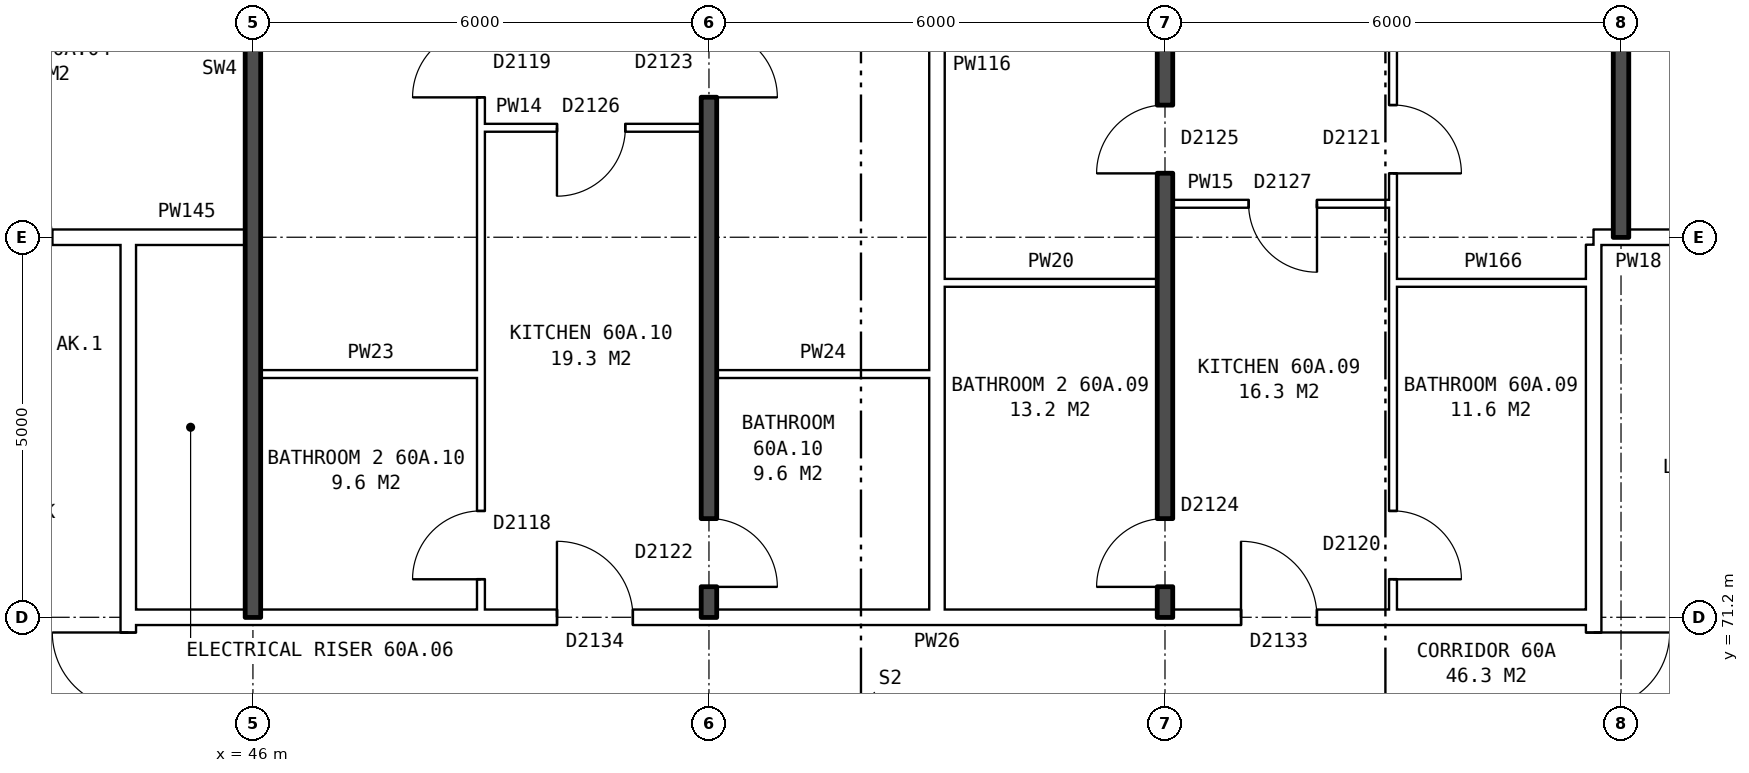
"""IFC4 building model, lengths in metres.
Left out: names, types, materials, properties, quantities, classifications, styles, units other than length and angle.
Written with IfcOpenShell. Run it as: python <this file> out.ifc"""

import sys

from ifc_helpers import new_model, si_unit, direction, frame, frame_2d, origin, place, context, subcontext, project, spatial, rectangle, extrude, element, fill, save


model = new_model("IFC4")
c1 = context("Model", 3, precision=1e-05, world=origin(), true_north=direction((0.0, 1.0)))
c2 = subcontext(c1, "Body", "Model", "MODEL_VIEW")
j1 = project(units=[si_unit("LENGTHUNIT", "METRE"), si_unit("PLANEANGLEUNIT", "RADIAN")], contexts=[c1])
p1 = place(None, origin())
s1 = spatial("IfcSite", under=j1, at=p1, CompositionType="ELEMENT")
p2 = place(p1, origin())
s2 = spatial("IfcBuilding", under=s1, at=p2, CompositionType="ELEMENT")
p3 = place(p2, frame((0.0, 0.0, 212.1)))
s3 = spatial("IfcBuildingStorey", under=s2, at=p3, CompositionType="ELEMENT", Elevation=212.1)
p4 = place(p3, frame((63.64, 63.9, 0.0), z_axis=(0.0, 0.0, 1.0), x_axis=(0.0, 1.0, 0.0)))
e1 = element("IfcWall", 1, at=p4, inside=s3, PredefinedType="PARTITIONING", context=c2, shape_type="SweptSolid", body=[
    extrude(rectangle(XDim=12.2, YDim=0.2, at=frame_2d((6.1, 0.0))), origin(), (0.0, 0.0, 1.0), 2.85),
])
p5 = place(p4, frame((5.1, 0.0, 0.0)))
e2 = element("IfcOpeningElement", 2, at=p5, cuts=e1, PredefinedType="OPENING", context=c2, shape_type="SweptSolid", body=[
    extrude(rectangle(XDim=2.0, YDim=2.1, at=frame_2d((1.0, 1.05))), frame((0.0, 0.11, 0.0), z_axis=(0.0, -1.0, 0.0), x_axis=(1.0, 0.0, 0.0)), (0.0, 0.0, 1.0), 0.22),
])
p6 = place(p3, frame((44.36, 63.9, 0.0), z_axis=(0.0, 0.0, 1.0), x_axis=(0.0, 1.0, 0.0)))
e3 = element("IfcWall", 3, at=p6, inside=s3, PredefinedType="PARTITIONING", context=c2, shape_type="SweptSolid", body=[
    extrude(rectangle(XDim=12.2, YDim=0.2, at=frame_2d((6.1, 0.0))), origin(), (0.0, 0.0, 1.0), 2.85),
])
p7 = place(p6, frame((5.1, 0.0, 0.0)))
e4 = element("IfcOpeningElement", 4, at=p7, cuts=e3, PredefinedType="OPENING", context=c2, shape_type="SweptSolid", body=[
    extrude(rectangle(XDim=2.0, YDim=2.1, at=frame_2d((1.0, 1.05))), frame((0.0, 0.11, 0.0), z_axis=(0.0, -1.0, 0.0), x_axis=(1.0, 0.0, 0.0)), (0.0, 0.0, 1.0), 0.22),
])
p8 = place(p3, frame((44.36, 71.2, 0.0), z_axis=(0.0, 0.0, 1.0), x_axis=(1.0, 0.0, 0.0)))
e5 = element("IfcWall", 5, at=p8, inside=s3, PredefinedType="PARTITIONING", context=c2, shape_type="SweptSolid", body=[
    extrude(rectangle(XDim=19.28, YDim=0.2, at=frame_2d((9.64, 0.0))), origin(), (0.0, 0.0, 1.0), 2.85),
])
p9 = place(p8, frame((14.64, 0.0, 0.0)))
e6 = element("IfcOpeningElement", 6, at=p9, cuts=e5, PredefinedType="OPENING", context=c2, shape_type="SweptSolid", body=[
    extrude(rectangle(XDim=1.0, YDim=2.1, at=frame_2d((0.5, 1.05))), frame((0.0, 0.11, 0.0), z_axis=(0.0, -1.0, 0.0), x_axis=(1.0, 0.0, 0.0)), (0.0, 0.0, 1.0), 0.22),
])
p10 = place(p8, frame((5.64, 0.0, 0.0)))
e7 = element("IfcOpeningElement", 7, at=p10, cuts=e5, PredefinedType="OPENING", context=c2, shape_type="SweptSolid", body=[
    extrude(rectangle(XDim=1.0, YDim=2.1, at=frame_2d((0.5, 1.05))), frame((0.0, 0.11, 0.0), z_axis=(0.0, -1.0, 0.0), x_axis=(1.0, 0.0, 0.0)), (0.0, 0.0, 1.0), 0.22),
])
p11 = place(p3, frame((46.1, 74.4, 0.0), z_axis=(0.0, 0.0, 1.0), x_axis=(1.0, 0.0, 0.0)))
e8 = element("IfcWall", 8, at=p11, inside=s3, PredefinedType="PARTITIONING", context=c2, shape_type="SweptSolid", body=[
    extrude(rectangle(XDim=2.9, YDim=0.1, at=frame_2d((1.45, 0.0))), origin(), (0.0, 0.0, 1.0), 2.85),
])
for number, where, z_axis, x_axis in (
    (9, (52.1, 74.4, 0.0), (0.0, 0.0, 1.0), (1.0, 0.0, 0.0)),
    (10, (55.1, 75.6, 0.0), (0.0, 0.0, 1.0), (1.0, 0.0, 0.0)),
):
    element("IfcWall", number, at=place(p3, frame(where, z_axis=z_axis, x_axis=x_axis)), inside=s3, PredefinedType="PARTITIONING", context=c2, shape_type="SweptSolid", body=[
        extrude(rectangle(XDim=2.8, YDim=0.1, at=frame_2d((1.4, 0.0))), origin(), (0.0, 0.0, 1.0), 2.85),
    ])
p12 = place(p3, frame((61.0, 75.6, 0.0), z_axis=(0.0, 0.0, 1.0), x_axis=(1.0, 0.0, 0.0)))
e11 = element("IfcWall", 11, at=p12, inside=s3, PredefinedType="PARTITIONING", context=c2, shape_type="SweptSolid", body=[
    extrude(rectangle(XDim=2.64, YDim=0.1, at=frame_2d((1.32, 0.0))), origin(), (0.0, 0.0, 1.0), 2.85),
])
p13 = place(p3, frame((41.36, 76.2, 0.0), z_axis=(0.0, 0.0, 1.0), x_axis=(1.0, 0.0, 0.0)))
e12 = element("IfcWall", 12, at=p13, inside=s3, PredefinedType="PARTITIONING", context=c2, shape_type="SweptSolid", body=[
    extrude(rectangle(XDim=3.0, YDim=0.2, at=frame_2d((1.5, 0.0))), origin(), (0.0, 0.0, 1.0), 2.85),
])
p14 = place(p13, frame((1.0, 0.0, 0.0)))
e13 = element("IfcOpeningElement", 13, at=p14, cuts=e12, PredefinedType="OPENING", context=c2, shape_type="SweptSolid", body=[
    extrude(rectangle(XDim=1.0, YDim=2.1, at=frame_2d((0.5, 1.05))), frame((0.0, 0.11, 0.0), z_axis=(0.0, -1.0, 0.0), x_axis=(1.0, 0.0, 0.0)), (0.0, 0.0, 1.0), 0.22),
])
p15 = place(p3, frame((44.36, 76.2, 0.0), z_axis=(0.0, 0.0, 1.0), x_axis=(1.0, 0.0, 0.0)))
e14 = element("IfcWall", 14, at=p15, inside=s3, PredefinedType="PARTITIONING", context=c2, shape_type="SweptSolid", body=[
    extrude(rectangle(XDim=1.54, YDim=0.2, at=frame_2d((0.77, 0.0))), origin(), (0.0, 0.0, 1.0), 2.85),
])
p16 = place(p3, frame((63.64, 76.2, 0.0), z_axis=(0.0, 0.0, 1.0), x_axis=(1.0, 0.0, 0.0)))
e15 = element("IfcWall", 15, at=p16, inside=s3, PredefinedType="PARTITIONING", context=c2, shape_type="SweptSolid", body=[
    extrude(rectangle(XDim=3.0, YDim=0.2, at=frame_2d((1.5, 0.0))), origin(), (0.0, 0.0, 1.0), 2.85),
])
p17 = place(p16, frame((1.18, 0.0, 0.0)))
e16 = element("IfcOpeningElement", 16, at=p17, cuts=e15, PredefinedType="OPENING", context=c2, shape_type="SweptSolid", body=[
    extrude(rectangle(XDim=1.0, YDim=2.1, at=frame_2d((0.5, 1.05))), frame((0.0, 0.11, 0.0), z_axis=(0.0, -1.0, 0.0), x_axis=(1.0, 0.0, 0.0)), (0.0, 0.0, 1.0), 0.22),
])
p18 = place(p3, frame((58.1, 76.64, 0.0), z_axis=(0.0, 0.0, 1.0), x_axis=(1.0, 0.0, 0.0)))
e17 = element("IfcWall", 17, at=p18, inside=s3, PredefinedType="PARTITIONING", context=c2, shape_type="SweptSolid", body=[
    extrude(rectangle(XDim=2.9, YDim=0.1, at=frame_2d((1.45, 0.0))), origin(), (0.0, 0.0, 1.0), 2.85),
])
p19 = place(p18, frame((1.0, 0.0, 0.0)))
e18 = element("IfcOpeningElement", 18, at=p19, cuts=e17, PredefinedType="OPENING", context=c2, shape_type="SweptSolid", body=[
    extrude(rectangle(XDim=0.9, YDim=2.1, at=frame_2d((0.45, 1.05))), frame((0.0, 0.06, 0.0), z_axis=(0.0, -1.0, 0.0), x_axis=(1.0, 0.0, 0.0)), (0.0, 0.0, 1.0), 0.12),
])
p20 = place(p3, frame((49.0, 77.64, 0.0), z_axis=(0.0, 0.0, 1.0), x_axis=(1.0, 0.0, 0.0)))
e19 = element("IfcWall", 19, at=p20, inside=s3, PredefinedType="PARTITIONING", context=c2, shape_type="SweptSolid", body=[
    extrude(rectangle(XDim=2.9, YDim=0.1, at=frame_2d((1.45, 0.0))), origin(), (0.0, 0.0, 1.0), 2.85),
])
p21 = place(p20, frame((1.0, 0.0, 0.0)))
e20 = element("IfcOpeningElement", 20, at=p21, cuts=e19, PredefinedType="OPENING", context=c2, shape_type="SweptSolid", body=[
    extrude(rectangle(XDim=0.9, YDim=2.1, at=frame_2d((0.45, 1.05))), frame((0.0, 0.06, 0.0), z_axis=(0.0, -1.0, 0.0), x_axis=(1.0, 0.0, 0.0)), (0.0, 0.0, 1.0), 0.12),
])
p22 = place(p3, frame((46.0, 71.2, 0.0), z_axis=(0.0, 0.0, 1.0), x_axis=(0.0, 1.0, 0.0)))
e21 = element("IfcWall", 21, at=p22, inside=s3, PredefinedType="SOLIDWALL", context=c2, shape_type="SweptSolid", body=[
    extrude(rectangle(XDim=14.44, YDim=0.2, at=frame_2d((7.22, 0.0))), origin(), (0.0, 0.0, 1.0), 2.85),
])
p23 = place(p3, frame((49.0, 71.3, 0.0), z_axis=(0.0, 0.0, 1.0), x_axis=(0.0, 1.0, 0.0)))
e22 = element("IfcWall", 22, at=p23, inside=s3, PredefinedType="PARTITIONING", context=c2, shape_type="SweptSolid", body=[
    extrude(rectangle(XDim=14.34, YDim=0.1, at=frame_2d((7.17, 0.0))), origin(), (0.0, 0.0, 1.0), 2.85),
])
p24 = place(p23, frame((6.74, 0.0, 0.0)))
e23 = element("IfcOpeningElement", 23, at=p24, cuts=e22, PredefinedType="OPENING", context=c2, shape_type="SweptSolid", body=[
    extrude(rectangle(XDim=0.9, YDim=2.1, at=frame_2d((0.45, 1.05))), frame((0.0, 0.06, 0.0), z_axis=(0.0, -1.0, 0.0), x_axis=(1.0, 0.0, 0.0)), (0.0, 0.0, 1.0), 0.12),
])
p25 = place(p23, frame((0.4, 0.0, 0.0)))
e24 = element("IfcOpeningElement", 24, at=p25, cuts=e22, PredefinedType="OPENING", context=c2, shape_type="SweptSolid", body=[
    extrude(rectangle(XDim=0.9, YDim=2.1, at=frame_2d((0.45, 1.05))), frame((0.0, 0.06, 0.0), z_axis=(0.0, -1.0, 0.0), x_axis=(1.0, 0.0, 0.0)), (0.0, 0.0, 1.0), 0.12),
])
p26 = place(p3, frame((52.0, 71.2, 0.0), z_axis=(0.0, 0.0, 1.0), x_axis=(0.0, 1.0, 0.0)))
e25 = element("IfcWall", 25, at=p26, inside=s3, PredefinedType="SOLIDWALL", context=c2, shape_type="SweptSolid", body=[
    extrude(rectangle(XDim=14.44, YDim=0.2, at=frame_2d((7.22, 0.0))), origin(), (0.0, 0.0, 1.0), 2.85),
])
p27 = place(p26, frame((6.84, 0.0, 0.0)))
e26 = element("IfcOpeningElement", 26, at=p27, cuts=e25, PredefinedType="OPENING", context=c2, shape_type="SweptSolid", body=[
    extrude(rectangle(XDim=0.9, YDim=2.1, at=frame_2d((0.45, 1.05))), frame((0.0, 0.11, 0.0), z_axis=(0.0, -1.0, 0.0), x_axis=(1.0, 0.0, 0.0)), (0.0, 0.0, 1.0), 0.22),
])
p28 = place(p26, frame((0.4, 0.0, 0.0)))
e27 = element("IfcOpeningElement", 27, at=p28, cuts=e25, PredefinedType="OPENING", context=c2, shape_type="SweptSolid", body=[
    extrude(rectangle(XDim=0.9, YDim=2.1, at=frame_2d((0.45, 1.05))), frame((0.0, 0.11, 0.0), z_axis=(0.0, -1.0, 0.0), x_axis=(1.0, 0.0, 0.0)), (0.0, 0.0, 1.0), 0.22),
])
p29 = place(p3, frame((55.0, 71.3, 0.0), z_axis=(0.0, 0.0, 1.0), x_axis=(0.0, 1.0, 0.0)))
e28 = element("IfcWall", 28, at=p29, inside=s3, PredefinedType="PARTITIONING", context=c2, shape_type="SweptSolid", body=[
    extrude(rectangle(XDim=14.34, YDim=0.2, at=frame_2d((7.17, 0.0))), origin(), (0.0, 0.0, 1.0), 2.85),
])
p30 = place(p3, frame((58.0, 71.2, 0.0), z_axis=(0.0, 0.0, 1.0), x_axis=(0.0, 1.0, 0.0)))
e29 = element("IfcWall", 29, at=p30, inside=s3, PredefinedType="SOLIDWALL", context=c2, shape_type="SweptSolid", body=[
    extrude(rectangle(XDim=14.44, YDim=0.2, at=frame_2d((7.22, 0.0))), origin(), (0.0, 0.0, 1.0), 2.85),
])
p31 = place(p30, frame((5.84, 0.0, 0.0)))
e30 = element("IfcOpeningElement", 30, at=p31, cuts=e29, PredefinedType="OPENING", context=c2, shape_type="SweptSolid", body=[
    extrude(rectangle(XDim=0.9, YDim=2.1, at=frame_2d((0.45, 1.05))), frame((0.0, 0.11, 0.0), z_axis=(0.0, -1.0, 0.0), x_axis=(1.0, 0.0, 0.0)), (0.0, 0.0, 1.0), 0.22),
])
p32 = place(p30, frame((0.4, 0.0, 0.0)))
e31 = element("IfcOpeningElement", 31, at=p32, cuts=e29, PredefinedType="OPENING", context=c2, shape_type="SweptSolid", body=[
    extrude(rectangle(XDim=0.9, YDim=2.1, at=frame_2d((0.45, 1.05))), frame((0.0, 0.11, 0.0), z_axis=(0.0, -1.0, 0.0), x_axis=(1.0, 0.0, 0.0)), (0.0, 0.0, 1.0), 0.22),
])
p33 = place(p3, frame((61.0, 71.3, 0.0), z_axis=(0.0, 0.0, 1.0), x_axis=(0.0, 1.0, 0.0)))
e32 = element("IfcWall", 32, at=p33, inside=s3, PredefinedType="PARTITIONING", context=c2, shape_type="SweptSolid", body=[
    extrude(rectangle(XDim=14.34, YDim=0.1, at=frame_2d((7.17, 0.0))), origin(), (0.0, 0.0, 1.0), 2.85),
])
p34 = place(p33, frame((5.74, 0.0, 0.0)))
e33 = element("IfcOpeningElement", 33, at=p34, cuts=e32, PredefinedType="OPENING", context=c2, shape_type="SweptSolid", body=[
    extrude(rectangle(XDim=0.9, YDim=2.1, at=frame_2d((0.45, 1.05))), frame((0.0, 0.06, 0.0), z_axis=(0.0, -1.0, 0.0), x_axis=(1.0, 0.0, 0.0)), (0.0, 0.0, 1.0), 0.12),
])
p35 = place(p33, frame((0.4, 0.0, 0.0)))
e34 = element("IfcOpeningElement", 34, at=p35, cuts=e32, PredefinedType="OPENING", context=c2, shape_type="SweptSolid", body=[
    extrude(rectangle(XDim=0.9, YDim=2.1, at=frame_2d((0.45, 1.05))), frame((0.0, 0.06, 0.0), z_axis=(0.0, -1.0, 0.0), x_axis=(1.0, 0.0, 0.0)), (0.0, 0.0, 1.0), 0.12),
])
p36 = place(p3, frame((64.0, 76.2, 0.0), z_axis=(0.0, 0.0, 1.0), x_axis=(0.0, 1.0, 0.0)))
e35 = element("IfcWall", 35, at=p36, inside=s3, PredefinedType="SOLIDWALL", context=c2, shape_type="SweptSolid", body=[
    extrude(rectangle(XDim=9.44, YDim=0.2, at=frame_2d((4.72, 0.0))), origin(), (0.0, 0.0, 1.0), 2.85),
])
p37 = place(p5, frame((2.0, 0.0, 0.0), z_axis=(0.0, 0.0, 1.0), x_axis=(-1.0, 0.0, 0.0)))
e36 = element("IfcDoor", 36, at=p37, inside=s3, OperationType="DOUBLE_DOOR_SINGLE_SWING", PredefinedType="DOOR", context=c2, shape_type="SweptSolid", body=[
    extrude(rectangle(XDim=2.0, YDim=2.1, at=frame_2d((1.0, 1.05))), frame((0.0, 0.025, 0.0), z_axis=(0.0, -1.0, 0.0), x_axis=(1.0, 0.0, 0.0)), (0.0, 0.0, 1.0), 0.05),
])
fill(e2, e36)
p38 = place(p7, origin())
e37 = element("IfcDoor", 37, at=p38, inside=s3, OperationType="DOUBLE_DOOR_SINGLE_SWING", PredefinedType="DOOR", context=c2, shape_type="SweptSolid", body=[
    extrude(rectangle(XDim=2.0, YDim=2.1, at=frame_2d((1.0, 1.05))), frame((0.0, 0.025, 0.0), z_axis=(0.0, -1.0, 0.0), x_axis=(1.0, 0.0, 0.0)), (0.0, 0.0, 1.0), 0.05),
])
fill(e4, e37)
p39 = place(p34, frame((0.9, 0.0, 0.0), z_axis=(0.0, 0.0, 1.0), x_axis=(-1.0, 0.0, 0.0)))
e38 = element("IfcDoor", 38, at=p39, inside=s3, OperationType="SINGLE_SWING_RIGHT", PredefinedType="DOOR", context=c2, shape_type="SweptSolid", body=[
    extrude(rectangle(XDim=0.9, YDim=2.1, at=frame_2d((0.45, 1.05))), frame((0.0, 0.025, 0.0), z_axis=(0.0, -1.0, 0.0), x_axis=(1.0, 0.0, 0.0)), (0.0, 0.0, 1.0), 0.05),
])
fill(e33, e38)
p40 = place(p31, origin())
e39 = element("IfcDoor", 39, at=p40, inside=s3, OperationType="SINGLE_SWING_LEFT", PredefinedType="DOOR", context=c2, shape_type="SweptSolid", body=[
    extrude(rectangle(XDim=0.9, YDim=2.1, at=frame_2d((0.45, 1.05))), frame((0.0, 0.025, 0.0), z_axis=(0.0, -1.0, 0.0), x_axis=(1.0, 0.0, 0.0)), (0.0, 0.0, 1.0), 0.05),
])
fill(e30, e39)
p41 = place(p9, origin())
e40 = element("IfcDoor", 40, at=p41, inside=s3, OperationType="SINGLE_SWING_LEFT", PredefinedType="DOOR", context=c2, shape_type="SweptSolid", body=[
    extrude(rectangle(XDim=1.0, YDim=2.1, at=frame_2d((0.5, 1.05))), frame((0.0, 0.025, 0.0), z_axis=(0.0, -1.0, 0.0), x_axis=(1.0, 0.0, 0.0)), (0.0, 0.0, 1.0), 0.05),
])
fill(e6, e40)
p42 = place(p19, frame((0.9, 0.0, 0.0), z_axis=(0.0, 0.0, 1.0), x_axis=(-1.0, 0.0, 0.0)))
e41 = element("IfcDoor", 41, at=p42, inside=s3, OperationType="SINGLE_SWING_LEFT", PredefinedType="DOOR", context=c2, shape_type="SweptSolid", body=[
    extrude(rectangle(XDim=0.9, YDim=2.1, at=frame_2d((0.45, 1.05))), frame((0.0, 0.025, 0.0), z_axis=(0.0, -1.0, 0.0), x_axis=(1.0, 0.0, 0.0)), (0.0, 0.0, 1.0), 0.05),
])
fill(e18, e41)
p43 = place(p35, frame((0.9, 0.0, 0.0), z_axis=(0.0, 0.0, 1.0), x_axis=(-1.0, 0.0, 0.0)))
e42 = element("IfcDoor", 42, at=p43, inside=s3, OperationType="SINGLE_SWING_RIGHT", PredefinedType="DOOR", context=c2, shape_type="SweptSolid", body=[
    extrude(rectangle(XDim=0.9, YDim=2.1, at=frame_2d((0.45, 1.05))), frame((0.0, 0.025, 0.0), z_axis=(0.0, -1.0, 0.0), x_axis=(1.0, 0.0, 0.0)), (0.0, 0.0, 1.0), 0.05),
])
fill(e34, e42)
p44 = place(p32, origin())
e43 = element("IfcDoor", 43, at=p44, inside=s3, OperationType="SINGLE_SWING_LEFT", PredefinedType="DOOR", context=c2, shape_type="SweptSolid", body=[
    extrude(rectangle(XDim=0.9, YDim=2.1, at=frame_2d((0.45, 1.05))), frame((0.0, 0.025, 0.0), z_axis=(0.0, -1.0, 0.0), x_axis=(1.0, 0.0, 0.0)), (0.0, 0.0, 1.0), 0.05),
])
fill(e31, e43)
p45 = place(p27, frame((0.9, 0.0, 0.0), z_axis=(0.0, 0.0, 1.0), x_axis=(-1.0, 0.0, 0.0)))
e44 = element("IfcDoor", 44, at=p45, inside=s3, OperationType="SINGLE_SWING_RIGHT", PredefinedType="DOOR", context=c2, shape_type="SweptSolid", body=[
    extrude(rectangle(XDim=0.9, YDim=2.1, at=frame_2d((0.45, 1.05))), frame((0.0, 0.025, 0.0), z_axis=(0.0, -1.0, 0.0), x_axis=(1.0, 0.0, 0.0)), (0.0, 0.0, 1.0), 0.05),
])
fill(e26, e44)
p46 = place(p24, origin())
e45 = element("IfcDoor", 45, at=p46, inside=s3, OperationType="SINGLE_SWING_LEFT", PredefinedType="DOOR", context=c2, shape_type="SweptSolid", body=[
    extrude(rectangle(XDim=0.9, YDim=2.1, at=frame_2d((0.45, 1.05))), frame((0.0, 0.025, 0.0), z_axis=(0.0, -1.0, 0.0), x_axis=(1.0, 0.0, 0.0)), (0.0, 0.0, 1.0), 0.05),
])
fill(e23, e45)
p47 = place(p10, origin())
e46 = element("IfcDoor", 46, at=p47, inside=s3, OperationType="SINGLE_SWING_LEFT", PredefinedType="DOOR", context=c2, shape_type="SweptSolid", body=[
    extrude(rectangle(XDim=1.0, YDim=2.1, at=frame_2d((0.5, 1.05))), frame((0.0, 0.025, 0.0), z_axis=(0.0, -1.0, 0.0), x_axis=(1.0, 0.0, 0.0)), (0.0, 0.0, 1.0), 0.05),
])
fill(e7, e46)
p48 = place(p21, frame((0.9, 0.0, 0.0), z_axis=(0.0, 0.0, 1.0), x_axis=(-1.0, 0.0, 0.0)))
e47 = element("IfcDoor", 47, at=p48, inside=s3, OperationType="SINGLE_SWING_RIGHT", PredefinedType="DOOR", context=c2, shape_type="SweptSolid", body=[
    extrude(rectangle(XDim=0.9, YDim=2.1, at=frame_2d((0.45, 1.05))), frame((0.0, 0.025, 0.0), z_axis=(0.0, -1.0, 0.0), x_axis=(1.0, 0.0, 0.0)), (0.0, 0.0, 1.0), 0.05),
])
fill(e20, e47)
p49 = place(p28, frame((0.9, 0.0, 0.0), z_axis=(0.0, 0.0, 1.0), x_axis=(-1.0, 0.0, 0.0)))
e48 = element("IfcDoor", 48, at=p49, inside=s3, OperationType="SINGLE_SWING_RIGHT", PredefinedType="DOOR", context=c2, shape_type="SweptSolid", body=[
    extrude(rectangle(XDim=0.9, YDim=2.1, at=frame_2d((0.45, 1.05))), frame((0.0, 0.025, 0.0), z_axis=(0.0, -1.0, 0.0), x_axis=(1.0, 0.0, 0.0)), (0.0, 0.0, 1.0), 0.05),
])
fill(e27, e48)
p50 = place(p25, origin())
e49 = element("IfcDoor", 49, at=p50, inside=s3, OperationType="SINGLE_SWING_LEFT", PredefinedType="DOOR", context=c2, shape_type="SweptSolid", body=[
    extrude(rectangle(XDim=0.9, YDim=2.1, at=frame_2d((0.45, 1.05))), frame((0.0, 0.025, 0.0), z_axis=(0.0, -1.0, 0.0), x_axis=(1.0, 0.0, 0.0)), (0.0, 0.0, 1.0), 0.05),
])
fill(e24, e49)
save(model, sys.argv[1])
